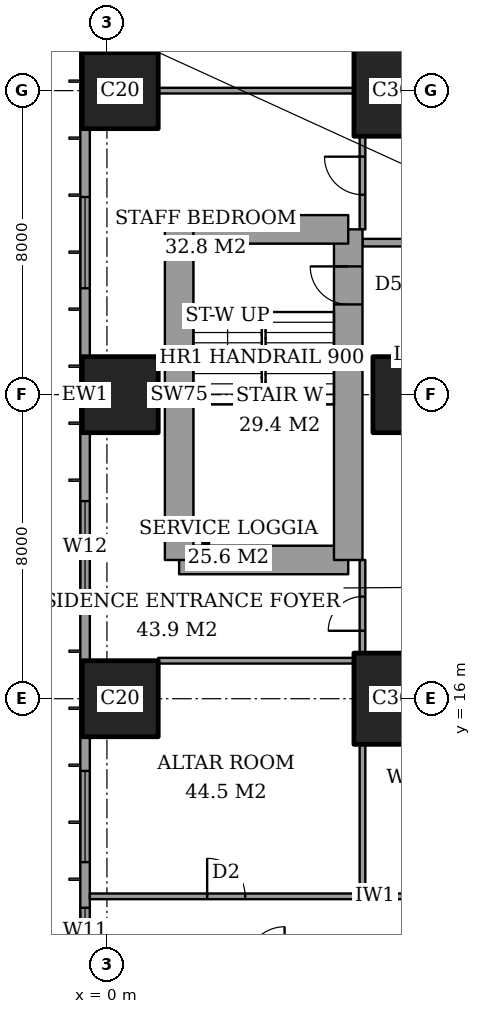
"""IFC4 building model, lengths in metres.
Left out: names, types, materials, properties, quantities, classifications, styles, units other than length and angle.
Written with IfcOpenShell. Run it as: python <this file> out.ifc"""

import sys

from ifc_helpers import new_model, si_unit, direction, frame, frame_2d, origin, origin_2d, place, context, subcontext, project, spatial, rectangle, extrude, element, fill, save


model = new_model("IFC4")
c1 = context("Model", 3, precision=1e-05, world=origin(), true_north=direction((0.0, 1.0)))
c2 = subcontext(c1, "Body", "Model", "MODEL_VIEW")
j1 = project(units=[si_unit("LENGTHUNIT", "METRE"), si_unit("PLANEANGLEUNIT", "RADIAN")], contexts=[c1])
p1 = place(None, origin())
s1 = spatial("IfcSite", under=j1, at=p1, CompositionType="ELEMENT")
p2 = place(p1, origin())
s2 = spatial("IfcBuilding", under=s1, at=p2, CompositionType="ELEMENT")
p3 = place(p2, frame((0.0, 0.0, 99.8)))
s3 = spatial("IfcBuildingStorey", under=s2, at=p3, CompositionType="ELEMENT", Elevation=99.8)
for number, where, z_axis, x_axis in (
    (1, (0.35, 16.0, 0.0), (0.0, 0.0, 1.0), (1.0, 0.0, 0.0)),
    (2, (0.35, 24.0, 0.0), (0.0, 0.0, 1.0), (1.0, 0.0, 0.0)),
    (3, (0.35, 32.0, 0.0), (0.0, 0.0, 1.0), (1.0, 0.0, 0.0)),
):
    element("IfcColumn", number, at=place(p3, frame(where, z_axis=z_axis, x_axis=x_axis)), inside=s3, PredefinedType="COLUMN", context=c2, shape_type="SweptSolid", body=[
        extrude(rectangle(XDim=2.0, YDim=2.0, at=origin_2d()), origin(), (0.0, 0.0, 1.0), 3.6),
    ])
p4 = place(p3, frame((8.0, 16.0, 0.0), z_axis=(0.0, 0.0, 1.0), x_axis=(1.0, 0.0, 0.0)))
e4 = element("IfcColumn", 4, at=p4, inside=s3, PredefinedType="COLUMN", context=c2, shape_type="SweptSolid", body=[
    extrude(rectangle(XDim=3.0, YDim=2.4, at=origin_2d()), origin(), (0.0, 0.0, 1.0), 3.6),
])
p5 = place(p3, frame((8.0, 24.0, 0.0), z_axis=(0.0, 0.0, 1.0), x_axis=(1.0, 0.0, 0.0)))
e5 = element("IfcColumn", 5, at=p5, inside=s3, PredefinedType="COLUMN", context=c2, shape_type="SweptSolid", body=[
    extrude(rectangle(XDim=2.0, YDim=2.0, at=origin_2d()), origin(), (0.0, 0.0, 1.0), 3.6),
])
p6 = place(p3, frame((8.0, 32.0, 0.0), z_axis=(0.0, 0.0, 1.0), x_axis=(1.0, 0.0, 0.0)))
e6 = element("IfcColumn", 6, at=p6, inside=s3, PredefinedType="COLUMN", context=c2, shape_type="SweptSolid", body=[
    extrude(rectangle(XDim=3.0, YDim=2.4, at=origin_2d()), origin(), (0.0, 0.0, 1.0), 3.6),
])
p7 = place(p3, frame((1.9, 19.65, 0.0), z_axis=(0.0, 0.0, 1.0), x_axis=(1.0, 0.0, 0.0)))
e7 = element("IfcWall", 7, at=p7, inside=s3, PredefinedType="SHEAR", context=c2, shape_type="SweptSolid", body=[
    extrude(rectangle(XDim=4.45, YDim=0.75, at=frame_2d((2.225, 0.0))), origin(), (0.0, 0.0, 1.0), 3.6),
])
p8 = place(p3, frame((6.35, 19.65, 0.0), z_axis=(0.0, 0.0, 1.0), x_axis=(0.0, 1.0, 0.0)))
e8 = element("IfcWall", 8, at=p8, inside=s3, PredefinedType="SHEAR", context=c2, shape_type="SweptSolid", body=[
    extrude(rectangle(XDim=8.7, YDim=0.75, at=frame_2d((4.35, 0.0))), origin(), (0.0, 0.0, 1.0), 3.6),
])
p9 = place(p8, frame((6.725, 0.0, 0.0)))
e9 = element("IfcOpeningElement", 9, at=p9, cuts=e8, PredefinedType="OPENING", context=c2, shape_type="SweptSolid", body=[
    extrude(rectangle(XDim=1.0, YDim=2.1, at=frame_2d((0.5, 1.05))), frame((0.0, 0.385, 0.0), z_axis=(0.0, -1.0, 0.0), x_axis=(1.0, 0.0, 0.0)), (0.0, 0.0, 1.0), 0.77),
])
p10 = place(p3, frame((6.35, 28.35, 0.0), z_axis=(0.0, 0.0, 1.0), x_axis=(-1.0, 0.0, 0.0)))
e10 = element("IfcWall", 10, at=p10, inside=s3, PredefinedType="SHEAR", context=c2, shape_type="SweptSolid", body=[
    extrude(rectangle(XDim=4.45, YDim=0.75, at=frame_2d((2.225, 0.0))), origin(), (0.0, 0.0, 1.0), 3.6),
])
p11 = place(p3, frame((1.9, 28.35, 0.0), z_axis=(0.0, 0.0, 1.0), x_axis=(0.0, -1.0, 0.0)))
e11 = element("IfcWall", 11, at=p11, inside=s3, PredefinedType="SHEAR", context=c2, shape_type="SweptSolid", body=[
    extrude(rectangle(XDim=8.7, YDim=0.75, at=frame_2d((4.35, 0.0))), origin(), (0.0, 0.0, 1.0), 3.6),
])
p12 = place(p3, frame((-0.575, 44.825, 0.0), z_axis=(0.0, 0.0, 1.0), x_axis=(0.0, -1.0, 0.0)))
e12 = element("IfcWall", 12, at=p12, inside=s3, PredefinedType="SOLIDWALL", context=c2, shape_type="SweptSolid", body=[
    extrude(rectangle(XDim=41.65, YDim=0.25, at=frame_2d((20.825, 0.0))), origin(), (0.0, 0.0, 1.0), 3.6),
])
p13 = place(p12, frame((0.775, 0.0, 0.4)))
e13 = element("IfcOpeningElement", 13, at=p13, cuts=e12, PredefinedType="OPENING", context=c2, shape_type="SweptSolid", body=[
    extrude(rectangle(XDim=2.4, YDim=2.2, at=frame_2d((1.2, 1.1))), frame((0.0, 0.135, 0.0), z_axis=(0.0, -1.0, 0.0), x_axis=(1.0, 0.0, 0.0)), (0.0, 0.0, 1.0), 0.27),
])
p14 = place(p12, frame((6.1, 0.0, 0.4)))
e14 = element("IfcOpeningElement", 14, at=p14, cuts=e12, PredefinedType="OPENING", context=c2, shape_type="SweptSolid", body=[
    extrude(rectangle(XDim=1.2, YDim=2.2, at=frame_2d((0.6, 1.1))), frame((0.0, 0.135, 0.0), z_axis=(0.0, -1.0, 0.0), x_axis=(1.0, 0.0, 0.0)), (0.0, 0.0, 1.0), 0.27),
])
p15 = place(p12, frame((8.425, 0.0, 0.4)))
e15 = element("IfcOpeningElement", 15, at=p15, cuts=e12, PredefinedType="OPENING", context=c2, shape_type="SweptSolid", body=[
    extrude(rectangle(XDim=2.4, YDim=2.2, at=frame_2d((1.2, 1.1))), frame((0.0, 0.135, 0.0), z_axis=(0.0, -1.0, 0.0), x_axis=(1.0, 0.0, 0.0)), (0.0, 0.0, 1.0), 0.27),
])
p16 = place(p12, frame((15.625, 0.0, 0.4)))
e16 = element("IfcOpeningElement", 16, at=p16, cuts=e12, PredefinedType="OPENING", context=c2, shape_type="SweptSolid", body=[
    extrude(rectangle(XDim=2.4, YDim=2.2, at=frame_2d((1.2, 1.1))), frame((0.0, 0.135, 0.0), z_axis=(0.0, -1.0, 0.0), x_axis=(1.0, 0.0, 0.0)), (0.0, 0.0, 1.0), 0.27),
])
p17 = place(p12, frame((23.625, 0.0, 0.4)))
e17 = element("IfcOpeningElement", 17, at=p17, cuts=e12, PredefinedType="OPENING", context=c2, shape_type="SweptSolid", body=[
    extrude(rectangle(XDim=2.4, YDim=2.2, at=frame_2d((1.2, 1.1))), frame((0.0, 0.135, 0.0), z_axis=(0.0, -1.0, 0.0), x_axis=(1.0, 0.0, 0.0)), (0.0, 0.0, 1.0), 0.27),
])
p18 = place(p12, frame((30.725, 0.0, 0.4)))
e18 = element("IfcOpeningElement", 18, at=p18, cuts=e12, PredefinedType="OPENING", context=c2, shape_type="SweptSolid", body=[
    extrude(rectangle(XDim=2.4, YDim=2.2, at=frame_2d((1.2, 1.1))), frame((0.0, 0.135, 0.0), z_axis=(0.0, -1.0, 0.0), x_axis=(1.0, 0.0, 0.0)), (0.0, 0.0, 1.0), 0.27),
])
p19 = place(p12, frame((34.325, 0.0, 0.4)))
e19 = element("IfcOpeningElement", 19, at=p19, cuts=e12, PredefinedType="OPENING", context=c2, shape_type="SweptSolid", body=[
    extrude(rectangle(XDim=1.2, YDim=2.2, at=frame_2d((0.6, 1.1))), frame((0.0, 0.135, 0.0), z_axis=(0.0, -1.0, 0.0), x_axis=(1.0, 0.0, 0.0)), (0.0, 0.0, 1.0), 0.27),
])
p20 = place(p12, frame((38.475, 0.0, 0.4)))
e20 = element("IfcOpeningElement", 20, at=p20, cuts=e12, PredefinedType="OPENING", context=c2, shape_type="SweptSolid", body=[
    extrude(rectangle(XDim=2.4, YDim=2.2, at=frame_2d((1.2, 1.1))), frame((0.0, 0.135, 0.0), z_axis=(0.0, -1.0, 0.0), x_axis=(1.0, 0.0, 0.0)), (0.0, 0.0, 1.0), 0.27),
])
p21 = place(p3, frame((-0.45, 10.8, 0.0), z_axis=(0.0, 0.0, 1.0), x_axis=(1.0, 0.0, 0.0)))
e21 = element("IfcWall", 21, at=p21, inside=s3, PredefinedType="PARTITIONING", context=c2, shape_type="SweptSolid", body=[
    extrude(rectangle(XDim=25.011, YDim=0.15, at=frame_2d((12.505, 0.0))), origin(), (0.0, 0.0, 1.0), 3.35),
])
p22 = place(p21, frame((12.05, 0.0, 0.0)))
e22 = element("IfcOpeningElement", 22, at=p22, cuts=e21, PredefinedType="OPENING", context=c2, shape_type="SweptSolid", body=[
    extrude(rectangle(XDim=1.0, YDim=2.1, at=frame_2d((0.5, 1.05))), frame((0.0, 0.085, 0.0), z_axis=(0.0, -1.0, 0.0), x_axis=(1.0, 0.0, 0.0)), (0.0, 0.0, 1.0), 0.17),
])
p23 = place(p21, frame((3.087, 0.0, 0.0)))
e23 = element("IfcOpeningElement", 23, at=p23, cuts=e21, PredefinedType="OPENING", context=c2, shape_type="SweptSolid", body=[
    extrude(rectangle(XDim=1.0, YDim=2.1, at=frame_2d((0.5, 1.05))), frame((0.0, 0.085, 0.0), z_axis=(0.0, -1.0, 0.0), x_axis=(1.0, 0.0, 0.0)), (0.0, 0.0, 1.0), 0.17),
])
p24 = place(p21, frame((8.863, 0.0, 0.0)))
e24 = element("IfcOpeningElement", 24, at=p24, cuts=e21, PredefinedType="OPENING", context=c2, shape_type="SweptSolid", body=[
    extrude(rectangle(XDim=0.9, YDim=2.1, at=frame_2d((0.45, 1.05))), frame((0.0, 0.085, 0.0), z_axis=(0.0, -1.0, 0.0), x_axis=(1.0, 0.0, 0.0)), (0.0, 0.0, 1.0), 0.17),
])
p25 = place(p21, frame((14.45, 0.0, 0.0)))
e25 = element("IfcOpeningElement", 25, at=p25, cuts=e21, PredefinedType="OPENING", context=c2, shape_type="SweptSolid", body=[
    extrude(rectangle(XDim=1.0, YDim=2.1, at=frame_2d((0.5, 1.05))), frame((0.0, 0.085, 0.0), z_axis=(0.0, -1.0, 0.0), x_axis=(1.0, 0.0, 0.0)), (0.0, 0.0, 1.0), 0.17),
])
p26 = place(p21, frame((16.9, 0.0, 0.0)))
e26 = element("IfcOpeningElement", 26, at=p26, cuts=e21, PredefinedType="OPENING", context=c2, shape_type="SweptSolid", body=[
    extrude(rectangle(XDim=0.9, YDim=2.1, at=frame_2d((0.45, 1.05))), frame((0.0, 0.085, 0.0), z_axis=(0.0, -1.0, 0.0), x_axis=(1.0, 0.0, 0.0)), (0.0, 0.0, 1.0), 0.17),
])
p27 = place(p21, frame((21.175, 0.0, 0.0)))
e27 = element("IfcOpeningElement", 27, at=p27, cuts=e21, PredefinedType="OPENING", context=c2, shape_type="SweptSolid", body=[
    extrude(rectangle(XDim=1.0, YDim=2.1, at=frame_2d((0.5, 1.05))), frame((0.0, 0.085, 0.0), z_axis=(0.0, -1.0, 0.0), x_axis=(1.0, 0.0, 0.0)), (0.0, 0.0, 1.0), 0.17),
])
p28 = place(p3, frame((1.35, 17.0, 0.0), z_axis=(0.0, 0.0, 1.0), x_axis=(1.0, 0.0, 0.0)))
e28 = element("IfcWall", 28, at=p28, inside=s3, PredefinedType="PARTITIONING", context=c2, shape_type="SweptSolid", body=[
    extrude(rectangle(XDim=5.15, YDim=0.15, at=frame_2d((2.575, 0.0))), origin(), (0.0, 0.0, 1.0), 3.35),
])
p29 = place(p3, frame((6.725, 28.0, 0.0), z_axis=(0.0, 0.0, 1.0), x_axis=(1.0, 0.0, 0.0)))
e29 = element("IfcWall", 29, at=p29, inside=s3, PredefinedType="PARTITIONING", context=c2, shape_type="SweptSolid", body=[
    extrude(rectangle(XDim=17.275, YDim=0.2, at=frame_2d((8.637, 0.0))), origin(), (0.0, 0.0, 1.0), 3.35),
])
p30 = place(p29, frame((6.675, 0.0, 0.0)))
e30 = element("IfcOpeningElement", 30, at=p30, cuts=e29, PredefinedType="OPENING", context=c2, shape_type="SweptSolid", body=[
    extrude(rectangle(XDim=1.2, YDim=2.4, at=frame_2d((0.6, 1.2))), frame((0.0, 0.11, 0.0), z_axis=(0.0, -1.0, 0.0), x_axis=(1.0, 0.0, 0.0)), (0.0, 0.0, 1.0), 0.22),
])
p31 = place(p3, frame((1.35, 32.0, 0.0), z_axis=(0.0, 0.0, 1.0), x_axis=(1.0, 0.0, 0.0)))
e31 = element("IfcWall", 31, at=p31, inside=s3, PredefinedType="PARTITIONING", context=c2, shape_type="SweptSolid", body=[
    extrude(rectangle(XDim=5.15, YDim=0.15, at=frame_2d((2.575, 0.0))), origin(), (0.0, 0.0, 1.0), 2.634),
])
p32 = place(p3, frame((6.725, 10.8, 0.0), z_axis=(0.0, 0.0, 1.0), x_axis=(0.0, 1.0, 0.0)))
e32 = element("IfcWall", 32, at=p32, inside=s3, PredefinedType="PARTITIONING", context=c2, shape_type="SweptSolid", body=[
    extrude(rectangle(XDim=4.0, YDim=0.15, at=frame_2d((2.0, 0.0))), origin(), (0.0, 0.0, 1.0), 3.35),
])
p33 = place(p3, frame((6.725, 17.2, 0.0), z_axis=(0.0, 0.0, 1.0), x_axis=(0.0, 1.0, 0.0)))
e33 = element("IfcWall", 33, at=p33, inside=s3, PredefinedType="PARTITIONING", context=c2, shape_type="SweptSolid", body=[
    extrude(rectangle(XDim=2.45, YDim=0.15, at=frame_2d((1.225, 0.0))), origin(), (0.0, 0.0, 1.0), 3.35),
])
p34 = place(p33, frame((0.587, 0.0, 0.0)))
e34 = element("IfcOpeningElement", 34, at=p34, cuts=e33, PredefinedType="OPENING", context=c2, shape_type="SweptSolid", body=[
    extrude(rectangle(XDim=0.9, YDim=2.1, at=frame_2d((0.45, 1.05))), frame((0.0, 0.085, 0.0), z_axis=(0.0, -1.0, 0.0), x_axis=(1.0, 0.0, 0.0)), (0.0, 0.0, 1.0), 0.17),
])
p35 = place(p3, frame((6.725, 28.35, 0.0), z_axis=(0.0, 0.0, 1.0), x_axis=(0.0, 1.0, 0.0)))
e35 = element("IfcWall", 35, at=p35, inside=s3, PredefinedType="PARTITIONING", context=c2, shape_type="SweptSolid", body=[
    extrude(rectangle(XDim=2.45, YDim=0.15, at=frame_2d((1.225, 0.0))), origin(), (0.0, 0.0, 1.0), 3.35),
])
p36 = place(p35, frame((0.913, 0.0, 0.0)))
e36 = element("IfcOpeningElement", 36, at=p36, cuts=e35, PredefinedType="OPENING", context=c2, shape_type="SweptSolid", body=[
    extrude(rectangle(XDim=1.0, YDim=2.1, at=frame_2d((0.5, 1.05))), frame((0.0, 0.085, 0.0), z_axis=(0.0, -1.0, 0.0), x_axis=(1.0, 0.0, 0.0)), (0.0, 0.0, 1.0), 0.17),
])
p37 = place(p16, origin())
e37 = element("IfcWindow", 37, at=p37, inside=s3, PartitioningType="SINGLE_PANEL", PredefinedType="WINDOW", context=c2, shape_type="SweptSolid", body=[
    extrude(rectangle(XDim=2.4, YDim=2.2, at=frame_2d((1.2, 1.1))), frame((0.0, 0.03, 0.0), z_axis=(0.0, -1.0, 0.0), x_axis=(1.0, 0.0, 0.0)), (0.0, 0.0, 1.0), 0.06),
])
fill(e16, e37)
p38 = place(p17, origin())
e38 = element("IfcWindow", 38, at=p38, inside=s3, PartitioningType="SINGLE_PANEL", PredefinedType="WINDOW", context=c2, shape_type="SweptSolid", body=[
    extrude(rectangle(XDim=2.4, YDim=2.2, at=frame_2d((1.2, 1.1))), frame((0.0, 0.03, 0.0), z_axis=(0.0, -1.0, 0.0), x_axis=(1.0, 0.0, 0.0)), (0.0, 0.0, 1.0), 0.06),
])
fill(e17, e38)
p39 = place(p18, origin())
e39 = element("IfcWindow", 39, at=p39, inside=s3, PartitioningType="SINGLE_PANEL", PredefinedType="WINDOW", context=c2, shape_type="SweptSolid", body=[
    extrude(rectangle(XDim=2.4, YDim=2.2, at=frame_2d((1.2, 1.1))), frame((0.0, 0.03, 0.0), z_axis=(0.0, -1.0, 0.0), x_axis=(1.0, 0.0, 0.0)), (0.0, 0.0, 1.0), 0.06),
])
fill(e18, e39)
p40 = place(p19, origin())
e40 = element("IfcWindow", 40, at=p40, inside=s3, PartitioningType="SINGLE_PANEL", PredefinedType="WINDOW", context=c2, shape_type="SweptSolid", body=[
    extrude(rectangle(XDim=1.2, YDim=2.2, at=frame_2d((0.6, 1.1))), frame((0.0, 0.03, 0.0), z_axis=(0.0, -1.0, 0.0), x_axis=(1.0, 0.0, 0.0)), (0.0, 0.0, 1.0), 0.06),
])
fill(e19, e40)
p41 = place(p23, origin())
e41 = element("IfcDoor", 41, at=p41, inside=s3, OperationType="SINGLE_SWING_RIGHT", PredefinedType="DOOR", context=c2, shape_type="SweptSolid", body=[
    extrude(rectangle(XDim=1.0, YDim=2.1, at=frame_2d((0.5, 1.05))), frame((0.0, 0.025, 0.0), z_axis=(0.0, -1.0, 0.0), x_axis=(1.0, 0.0, 0.0)), (0.0, 0.0, 1.0), 0.05),
])
fill(e23, e41)
p42 = place(p34, origin())
e42 = element("IfcDoor", 42, at=p42, inside=s3, OperationType="SINGLE_SWING_RIGHT", PredefinedType="DOOR", context=c2, shape_type="SweptSolid", body=[
    extrude(rectangle(XDim=0.9, YDim=2.1, at=frame_2d((0.45, 1.05))), frame((0.0, 0.025, 0.0), z_axis=(0.0, -1.0, 0.0), x_axis=(1.0, 0.0, 0.0)), (0.0, 0.0, 1.0), 0.05),
])
fill(e34, e42)
p43 = place(p36, origin())
e43 = element("IfcDoor", 43, at=p43, inside=s3, OperationType="SINGLE_SWING_LEFT", PredefinedType="DOOR", context=c2, shape_type="SweptSolid", body=[
    extrude(rectangle(XDim=1.0, YDim=2.1, at=frame_2d((0.5, 1.05))), frame((0.0, 0.025, 0.0), z_axis=(0.0, -1.0, 0.0), x_axis=(1.0, 0.0, 0.0)), (0.0, 0.0, 1.0), 0.05),
])
fill(e36, e43)
p44 = place(p9, origin())
e44 = element("IfcDoor", 44, at=p44, inside=s3, OperationType="SINGLE_SWING_LEFT", PredefinedType="DOOR", context=c2, shape_type="SweptSolid", body=[
    extrude(rectangle(XDim=1.0, YDim=2.1, at=frame_2d((0.5, 1.05))), frame((0.0, 0.025, 0.0), z_axis=(0.0, -1.0, 0.0), x_axis=(1.0, 0.0, 0.0)), (0.0, 0.0, 1.0), 0.05),
])
fill(e9, e44)
save(model, sys.argv[1])
